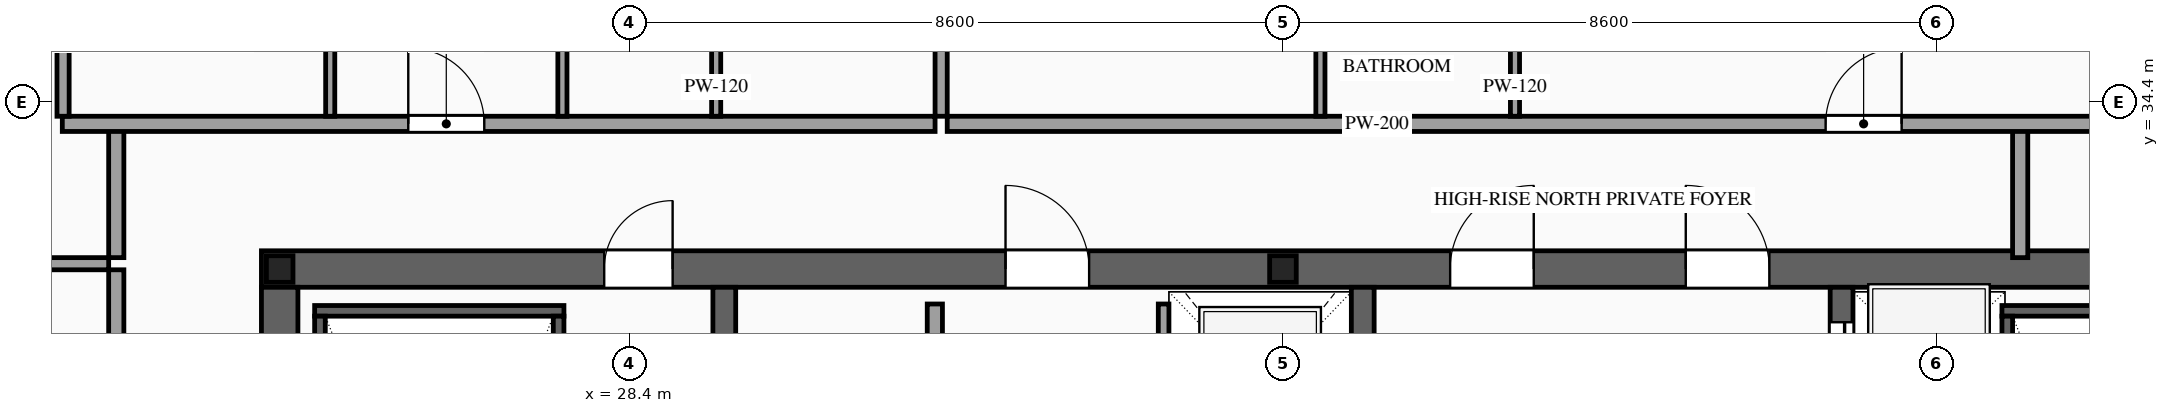
"""IFC4 building model, lengths in metres.
Left out: names, types, materials, properties, quantities, classifications, styles, units other than length and angle.
Written with IfcOpenShell. Run it as: python <this file> out.ifc"""

import sys

from ifc_helpers import new_model, si_unit, direction, frame, frame_2d, origin, origin_2d, place, context, subcontext, project, spatial, rectangle, i_section, extrude, source, transform, mapped, element, fill, save


model = new_model("IFC4")
c1 = context("Model", 3, precision=1e-05, world=origin(), true_north=direction((0.0, 1.0)))
c2 = subcontext(c1, "Body", "Model", "MODEL_VIEW")
j1 = project(units=[si_unit("LENGTHUNIT", "METRE"), si_unit("PLANEANGLEUNIT", "RADIAN")], contexts=[c1])
p1 = place(None, origin())
s1 = spatial("IfcSite", under=j1, at=p1, CompositionType="ELEMENT")
p2 = place(p1, origin())
s2 = spatial("IfcBuilding", under=s1, at=p2, CompositionType="ELEMENT")
p3 = place(p2, frame((0.0, 0.0, 347.2)))
s3 = spatial("IfcBuildingStorey", under=s2, at=p3, CompositionType="ELEMENT", Elevation=347.2)
p4 = place(p3, frame((23.56, 32.2, 0.0), z_axis=(0.0, 0.0, 1.0), x_axis=(1.0, 0.0, 0.0)))
e1 = element("IfcWall", 1, at=p4, inside=s3, PredefinedType="SHEAR", context=c2, shape_type="SweptSolid", body=[
    extrude(rectangle(XDim=26.88, YDim=0.48, at=frame_2d((13.44, 0.0))), origin(), (0.0, 0.0, 1.0), 4.0),
])
p5 = place(p4, frame((4.51, 0.0, 0.0)))
e2 = element("IfcOpeningElement", 2, at=p5, cuts=e1, PredefinedType="OPENING", context=c2, shape_type="SweptSolid", body=[
    extrude(rectangle(XDim=0.9, YDim=2.15, at=frame_2d((0.45, 1.075))), frame((0.0, 0.255, 0.0), z_axis=(0.0, -1.0, 0.0), x_axis=(1.0, 0.0, 0.0)), (0.0, 0.0, 1.0), 0.51),
])
p6 = place(p4, frame((9.79, 0.0, 0.0)))
e3 = element("IfcOpeningElement", 3, at=p6, cuts=e1, PredefinedType="OPENING", context=c2, shape_type="SweptSolid", body=[
    extrude(rectangle(XDim=1.1, YDim=2.2, at=frame_2d((0.55, 1.1))), frame((0.0, 0.255, 0.0), z_axis=(0.0, -1.0, 0.0), x_axis=(1.0, 0.0, 0.0)), (0.0, 0.0, 1.0), 0.51),
])
p7 = place(p4, frame((15.64, 0.0, 0.0)))
e4 = element("IfcOpeningElement", 4, at=p7, cuts=e1, PredefinedType="OPENING", context=c2, shape_type="SweptSolid", body=[
    extrude(rectangle(XDim=1.1, YDim=2.2, at=frame_2d((0.55, 1.1))), frame((0.0, 0.255, 0.0), z_axis=(0.0, -1.0, 0.0), x_axis=(1.0, 0.0, 0.0)), (0.0, 0.0, 1.0), 0.51),
])
p8 = place(p4, frame((18.74, 0.0, 0.0)))
e5 = element("IfcOpeningElement", 5, at=p8, cuts=e1, PredefinedType="OPENING", context=c2, shape_type="SweptSolid", body=[
    extrude(rectangle(XDim=1.1, YDim=2.2, at=frame_2d((0.55, 1.1))), frame((0.0, 0.255, 0.0), z_axis=(0.0, -1.0, 0.0), x_axis=(1.0, 0.0, 0.0)), (0.0, 0.0, 1.0), 0.51),
])
m1 = source(origin(), c2, "Body", "SweptSolid", [
    extrude(rectangle(XDim=12.32, YDim=0.48, at=frame_2d((6.16, 0.0))), origin(), (0.0, 0.0, 1.0), 4.0),
])
p9 = place(p3, frame((23.8, 19.64, 0.0), z_axis=(0.0, 0.0, 1.0), x_axis=(0.0, 1.0, 0.0)))
e6 = element("IfcWall", 6, at=p9, inside=s3, PredefinedType="SHEAR", context=c2, shape_type="MappedRepresentation", body=[
    mapped(m1, transform((0.0, 0.0, 0.0), scale=1.0)),
])
m2 = source(origin(), c2, "Body", "SweptSolid", [
    extrude(rectangle(XDim=12.32, YDim=0.3, at=frame_2d((6.16, 0.0))), origin(), (0.0, 0.0, 1.0), 4.0),
])
for number, where, z_axis, x_axis in (
    (7, (29.65, 19.64, 0.0), (0.0, 0.0, 1.0), (0.0, 1.0, 0.0)),
    (8, (38.05, 19.64, 0.0), (0.0, 0.0, 1.0), (0.0, 1.0, 0.0)),
):
    element("IfcWall", number, at=place(p3, frame(where, z_axis=z_axis, x_axis=x_axis)), inside=s3, PredefinedType="SOLIDWALL", context=c2, shape_type="MappedRepresentation", body=[
        mapped(m2, transform((0.0, 0.0, 0.0), scale=1.0)),
    ])
p10 = place(p3, frame((44.35, 19.64, 0.0), z_axis=(0.0, 0.0, 1.0), x_axis=(0.0, 1.0, 0.0)))
e9 = element("IfcWall", 9, at=p10, inside=s3, PredefinedType="SOLIDWALL", context=c2, shape_type="SweptSolid", body=[
    extrude(rectangle(XDim=12.32, YDim=0.3, at=frame_2d((6.16, 0.0))), origin(), (0.0, 0.0, 1.0), 4.0),
])
p11 = place(p10, frame((6.56, 0.0, 0.0)))
e10 = element("IfcOpeningElement", 10, at=p11, cuts=e9, PredefinedType="OPENING", context=c2, shape_type="SweptSolid", body=[
    extrude(rectangle(XDim=1.1, YDim=2.2, at=frame_2d((0.55, 1.1))), frame((0.0, 0.165, 0.0), z_axis=(0.0, -1.0, 0.0), x_axis=(1.0, 0.0, 0.0)), (0.0, 0.0, 1.0), 0.33),
])
p12 = place(p10, frame((8.66, 0.0, 0.0)))
e11 = element("IfcOpeningElement", 11, at=p12, cuts=e9, PredefinedType="OPENING", context=c2, shape_type="SweptSolid", body=[
    extrude(rectangle(XDim=1.1, YDim=2.2, at=frame_2d((0.55, 1.1))), frame((0.0, 0.165, 0.0), z_axis=(0.0, -1.0, 0.0), x_axis=(1.0, 0.0, 0.0)), (0.0, 0.0, 1.0), 0.33),
])
p13 = place(p10, frame((10.76, 0.0, 0.0)))
e12 = element("IfcOpeningElement", 12, at=p13, cuts=e9, PredefinedType="OPENING", context=c2, shape_type="SweptSolid", body=[
    extrude(rectangle(XDim=1.1, YDim=2.2, at=frame_2d((0.55, 1.1))), frame((0.0, 0.165, 0.0), z_axis=(0.0, -1.0, 0.0), x_axis=(1.0, 0.0, 0.0)), (0.0, 0.0, 1.0), 0.33),
])
m3 = source(origin(), c2, "Body", "SweptSolid", [
    extrude(i_section(OverallWidth=0.35, OverallDepth=0.35, WebThickness=0.012, FlangeThickness=0.019, at=origin_2d()), origin(), (0.0, 0.0, 1.0), 4.0),
])
for number, where, z_axis, x_axis in (
    (13, (23.8, 32.2, 0.0), (0.0, 0.0, 1.0), (1.0, 0.0, 0.0)),
    (14, (37.0, 32.2, 0.0), (0.0, 0.0, 1.0), (1.0, 0.0, 0.0)),
):
    element("IfcColumn", number, at=place(p3, frame(where, z_axis=z_axis, x_axis=x_axis)), inside=s3, PredefinedType="COLUMN", context=c2, shape_type="MappedRepresentation", body=[
        mapped(m3, transform((0.0, 0.0, 0.0), scale=1.0)),
    ])
p14 = place(p3, frame((35.43, 29.4, 0.0), z_axis=(0.0, 0.0, 1.0), x_axis=(0.0, 1.0, 0.0)))
e15 = element("IfcWall", 15, at=p14, inside=s3, PredefinedType="SOLIDWALL", context=c2, shape_type="SweptSolid", body=[
    extrude(rectangle(XDim=2.34, YDim=0.14, at=frame_2d((1.17, 0.0))), origin(), (0.0, 0.0, 1.0), 3.7),
])
p15 = place(p14, frame((0.62, 0.0, 0.0)))
e16 = element("IfcOpeningElement", 16, at=p15, cuts=e15, PredefinedType="OPENING", context=c2, shape_type="SweptSolid", body=[
    extrude(rectangle(XDim=1.1, YDim=2.2, at=frame_2d((0.55, 1.1))), frame((0.0, 0.085, 0.0), z_axis=(0.0, -1.0, 0.0), x_axis=(1.0, 0.0, 0.0)), (0.0, 0.0, 1.0), 0.17),
])
m4 = source(origin(), c2, "Body", "SweptSolid", [
    extrude(rectangle(XDim=3.28, YDim=0.14, at=frame_2d((1.64, 0.0))), origin(), (0.0, 0.0, 1.0), 3.7),
])
p16 = place(p3, frame((24.26, 31.65, 0.0), z_axis=(0.0, 0.0, 1.0), x_axis=(1.0, 0.0, 0.0)))
e17 = element("IfcWall", 17, at=p16, inside=s3, PredefinedType="SOLIDWALL", context=c2, shape_type="MappedRepresentation", body=[
    mapped(m4, transform((0.0, 0.0, 0.0), scale=1.0)),
])
m5 = source(origin(), c2, "Body", "SweptSolid", [
    extrude(rectangle(XDim=8.94, YDim=0.14, at=frame_2d((4.47, 0.0))), origin(), (0.0, 0.0, 1.0), 3.7),
])
for number, where, z_axis, x_axis in (
    (18, (24.33, 22.64, 0.0), (0.0, 0.0, 1.0), (0.0, 1.0, 0.0)),
    (19, (27.47, 22.64, 0.0), (0.0, 0.0, 1.0), (0.0, 1.0, 0.0)),
):
    element("IfcWall", number, at=place(p3, frame(where, z_axis=z_axis, x_axis=x_axis)), inside=s3, PredefinedType="SOLIDWALL", context=c2, shape_type="MappedRepresentation", body=[
        mapped(m5, transform((0.0, 0.0, 0.0), scale=1.0)),
    ])
p17 = place(p3, frame((46.46, 31.65, 0.0), z_axis=(0.0, 0.0, 1.0), x_axis=(1.0, 0.0, 0.0)))
e20 = element("IfcWall", 20, at=p17, inside=s3, PredefinedType="SOLIDWALL", context=c2, shape_type="MappedRepresentation", body=[
    mapped(m4, transform((0.0, 0.0, 0.0), scale=1.0)),
])
p18 = place(p3, frame((46.53, 22.64, 0.0), z_axis=(0.0, 0.0, 1.0), x_axis=(0.0, 1.0, 0.0)))
e21 = element("IfcWall", 21, at=p18, inside=s3, PredefinedType="SOLIDWALL", context=c2, shape_type="MappedRepresentation", body=[
    mapped(m5, transform((0.0, 0.0, 0.0), scale=1.0)),
])
p19 = place(p3, frame((32.42, 28.05, 0.0), z_axis=(0.0, 0.0, 1.0), x_axis=(0.0, 1.0, 0.0)))
e22 = element("IfcWall", 22, at=p19, inside=s3, PredefinedType="PARTITIONING", context=c2, shape_type="SweptSolid", body=[
    extrude(rectangle(XDim=3.69, YDim=0.2, at=frame_2d((1.845, 0.0))), origin(), (0.0, 0.0, 1.0), 3.7),
])
p20 = place(p19, frame((1.395, 0.0, 0.0)))
e23 = element("IfcOpeningElement", 23, at=p20, cuts=e22, PredefinedType="OPENING", context=c2, shape_type="SweptSolid", body=[
    extrude(rectangle(XDim=0.9, YDim=2.15, at=frame_2d((0.45, 1.075))), frame((0.0, 0.115, 0.0), z_axis=(0.0, -1.0, 0.0), x_axis=(1.0, 0.0, 0.0)), (0.0, 0.0, 1.0), 0.23),
])
m6 = source(origin(), c2, "Body", "SweptSolid", [
    extrude(rectangle(XDim=1.7, YDim=0.2, at=frame_2d((0.85, 0.0))), origin(), (0.0, 0.0, 1.0), 3.7),
])
for number, where, z_axis, x_axis in (
    (24, (21.65, 32.35, 0.0), (0.0, 0.0, 1.0), (0.0, 1.0, 0.0)),
    (25, (46.7, 32.35, 0.0), (0.0, 0.0, 1.0), (0.0, 1.0, 0.0)),
):
    element("IfcWall", number, at=place(p3, frame(where, z_axis=z_axis, x_axis=x_axis)), inside=s3, PredefinedType="PARTITIONING", context=c2, shape_type="MappedRepresentation", body=[
        mapped(m6, transform((0.0, 0.0, 0.0), scale=1.0)),
    ])
p21 = place(p3, frame((20.94, 34.11, 0.0), z_axis=(0.0, 0.0, 1.0), x_axis=(1.0, 0.0, 0.0)))
e26 = element("IfcWall", 26, at=p21, inside=s3, PredefinedType="PARTITIONING", context=c2, shape_type="SweptSolid", body=[
    extrude(rectangle(XDim=11.483, YDim=0.2, at=frame_2d((5.742, 0.0))), origin(), (0.0, 0.0, 1.0), 3.7),
])
p22 = place(p21, frame((4.552, 0.0, 0.0)))
e27 = element("IfcOpeningElement", 27, at=p22, cuts=e26, PredefinedType="OPENING", context=c2, shape_type="SweptSolid", body=[
    extrude(rectangle(XDim=1.0, YDim=2.2, at=frame_2d((0.5, 1.1))), frame((0.0, 0.115, 0.0), z_axis=(0.0, -1.0, 0.0), x_axis=(1.0, 0.0, 0.0)), (0.0, 0.0, 1.0), 0.23),
])
m7 = source(origin(), c2, "Body", "SweptSolid", [
    extrude(rectangle(XDim=10.54, YDim=0.16, at=frame_2d((5.27, 0.0))), origin(), (0.0, 0.0, 1.0), 3.7),
])
p23 = place(p3, frame((32.503, 34.21, 0.0), z_axis=(0.0, 0.0, 1.0), x_axis=(0.0, 1.0, 0.0)))
e28 = element("IfcWall", 28, at=p23, inside=s3, PredefinedType="PARTITIONING", context=c2, shape_type="MappedRepresentation", body=[
    mapped(m7, transform((0.0, 0.0, 0.0), scale=1.0)),
])
m8 = source(origin(), c2, "Body", "SweptSolid", [
    extrude(rectangle(XDim=2.9, YDim=0.12, at=frame_2d((1.45, 0.0))), origin(), (0.0, 0.0, 1.0), 3.7),
])
p24 = place(p3, frame((24.465, 34.21, 0.0), z_axis=(0.0, 0.0, 1.0), x_axis=(0.0, 1.0, 0.0)))
e29 = element("IfcWall", 29, at=p24, inside=s3, PredefinedType="PARTITIONING", context=c2, shape_type="MappedRepresentation", body=[
    mapped(m8, transform((0.0, 0.0, 0.0), scale=1.0)),
])
p25 = place(p3, frame((29.543, 34.21, 0.0), z_axis=(0.0, 0.0, 1.0), x_axis=(0.0, 1.0, 0.0)))
e30 = element("IfcWall", 30, at=p25, inside=s3, PredefinedType="PARTITIONING", context=c2, shape_type="SweptSolid", body=[
    extrude(rectangle(XDim=2.9, YDim=0.12, at=frame_2d((1.45, 0.0))), origin(), (0.0, 0.0, 1.0), 3.7),
])
p26 = place(p25, frame((1.025, 0.0, 0.0)))
e31 = element("IfcOpeningElement", 31, at=p26, cuts=e30, PredefinedType="OPENING", context=c2, shape_type="SweptSolid", body=[
    extrude(rectangle(XDim=0.85, YDim=2.1, at=frame_2d((0.425, 1.05))), frame((0.0, 0.075, 0.0), z_axis=(0.0, -1.0, 0.0), x_axis=(1.0, 0.0, 0.0)), (0.0, 0.0, 1.0), 0.15),
])
p27 = place(p3, frame((27.52, 34.21, 0.0), z_axis=(0.0, 0.0, 1.0), x_axis=(0.0, 1.0, 0.0)))
e32 = element("IfcWall", 32, at=p27, inside=s3, PredefinedType="PARTITIONING", context=c2, shape_type="SweptSolid", body=[
    extrude(rectangle(XDim=2.9, YDim=0.12, at=frame_2d((1.45, 0.0))), origin(), (0.0, 0.0, 1.0), 3.7),
])
p28 = place(p27, frame((1.025, 0.0, 0.0)))
e33 = element("IfcOpeningElement", 33, at=p28, cuts=e32, PredefinedType="OPENING", context=c2, shape_type="SweptSolid", body=[
    extrude(rectangle(XDim=0.85, YDim=2.1, at=frame_2d((0.425, 1.05))), frame((0.0, 0.075, 0.0), z_axis=(0.0, -1.0, 0.0), x_axis=(1.0, 0.0, 0.0)), (0.0, 0.0, 1.0), 0.15),
])
p29 = place(p3, frame((32.583, 34.11, 0.0), z_axis=(0.0, 0.0, 1.0), x_axis=(1.0, 0.0, 0.0)))
e34 = element("IfcWall", 34, at=p29, inside=s3, PredefinedType="PARTITIONING", context=c2, shape_type="SweptSolid", body=[
    extrude(rectangle(XDim=20.477, YDim=0.2, at=frame_2d((10.239, 0.0))), origin(), (0.0, 0.0, 1.0), 3.7),
])
p30 = place(p29, frame((11.557, 0.0, 0.0)))
e35 = element("IfcOpeningElement", 35, at=p30, cuts=e34, PredefinedType="OPENING", context=c2, shape_type="SweptSolid", body=[
    extrude(rectangle(XDim=1.0, YDim=2.2, at=frame_2d((0.5, 1.1))), frame((0.0, 0.115, 0.0), z_axis=(0.0, -1.0, 0.0), x_axis=(1.0, 0.0, 0.0)), (0.0, 0.0, 1.0), 0.23),
])
m9 = source(origin(), c2, "Body", "SweptSolid", [
    extrude(rectangle(XDim=10.39, YDim=0.16, at=frame_2d((5.195, 0.0))), origin(), (0.0, 0.0, 1.0), 3.7),
])
p31 = place(p3, frame((20.95, 34.21, 0.0), z_axis=(0.0, 0.0, 1.0), x_axis=(0.0, 1.0, 0.0)))
e36 = element("IfcWall", 36, at=p31, inside=s3, PredefinedType="PARTITIONING", context=c2, shape_type="MappedRepresentation", body=[
    mapped(m9, transform((0.0, 0.0, 0.0), scale=1.0)),
])
p32 = place(p3, frame((37.493, 34.21, 0.0), z_axis=(0.0, 0.0, 1.0), x_axis=(0.0, 1.0, 0.0)))
e37 = element("IfcWall", 37, at=p32, inside=s3, PredefinedType="PARTITIONING", context=c2, shape_type="MappedRepresentation", body=[
    mapped(m8, transform((0.0, 0.0, 0.0), scale=1.0)),
])
p33 = place(p3, frame((40.053, 34.21, 0.0), z_axis=(0.0, 0.0, 1.0), x_axis=(0.0, 1.0, 0.0)))
e38 = element("IfcWall", 38, at=p33, inside=s3, PredefinedType="PARTITIONING", context=c2, shape_type="SweptSolid", body=[
    extrude(rectangle(XDim=2.9, YDim=0.12, at=frame_2d((1.45, 0.0))), origin(), (0.0, 0.0, 1.0), 3.7),
])
p34 = place(p33, frame((1.025, 0.0, 0.0)))
e39 = element("IfcOpeningElement", 39, at=p34, cuts=e38, PredefinedType="OPENING", context=c2, shape_type="SweptSolid", body=[
    extrude(rectangle(XDim=0.85, YDim=2.1, at=frame_2d((0.425, 1.05))), frame((0.0, 0.075, 0.0), z_axis=(0.0, -1.0, 0.0), x_axis=(1.0, 0.0, 0.0)), (0.0, 0.0, 1.0), 0.15),
])
p35 = place(p3, frame((21.65, 19.41, 0.0), z_axis=(0.0, 0.0, 1.0), x_axis=(0.0, 1.0, 0.0)))
e40 = element("IfcWall", 40, at=p35, inside=s3, PredefinedType="PARTITIONING", context=c2, shape_type="SweptSolid", body=[
    extrude(rectangle(XDim=12.78, YDim=0.2, at=frame_2d((6.39, 0.0))), origin(), (0.0, 0.0, 1.0), 3.7),
])
p36 = place(p35, frame((5.89, 0.0, 0.0)))
e41 = element("IfcOpeningElement", 41, at=p36, cuts=e40, PredefinedType="OPENING", context=c2, shape_type="SweptSolid", body=[
    extrude(rectangle(XDim=1.0, YDim=2.2, at=frame_2d((0.5, 1.1))), frame((0.0, 0.115, 0.0), z_axis=(0.0, -1.0, 0.0), x_axis=(1.0, 0.0, 0.0)), (0.0, 0.0, 1.0), 0.23),
])
m10 = source(origin(), c2, "Body", "SweptSolid", [
    extrude(rectangle(XDim=3.5, YDim=0.16, at=frame_2d((1.75, 0.0))), origin(), (0.0, 0.0, 1.0), 3.245),
])
p37 = place(p3, frame((18.05, 32.27, 0.0), z_axis=(0.0, 0.0, 1.0), x_axis=(1.0, 0.0, 0.0)))
e42 = element("IfcWall", 42, at=p37, inside=s3, PredefinedType="PARTITIONING", context=c2, shape_type="MappedRepresentation", body=[
    mapped(m10, transform((0.0, 0.0, 0.0), scale=1.0)),
])
m11 = source(origin(), c2, "Body", "SweptSolid", [
    extrude(rectangle(XDim=1.1, YDim=2.2, at=frame_2d((0.55, 1.1))), frame((0.0, 0.025, 0.0), z_axis=(0.0, -1.0, 0.0), x_axis=(1.0, 0.0, 0.0)), (0.0, 0.0, 1.0), 0.05),
])
p38 = place(p13, origin())
e43 = element("IfcDoor", 43, at=p38, inside=s3, OperationType="SLIDING_TO_LEFT", PredefinedType="DOOR", context=c2, shape_type="MappedRepresentation", body=[
    mapped(m11, transform((0.0, 0.0, 0.0), scale=1.0)),
])
fill(e12, e43)
m12 = source(origin(), c2, "Body", "SweptSolid", [
    extrude(rectangle(XDim=0.9, YDim=2.15, at=frame_2d((0.45, 1.075))), frame((0.0, 0.025, 0.0), z_axis=(0.0, -1.0, 0.0), x_axis=(1.0, 0.0, 0.0)), (0.0, 0.0, 1.0), 0.05),
])
p39 = place(p5, origin())
e44 = element("IfcDoor", 44, at=p39, inside=s3, OperationType="SINGLE_SWING_RIGHT", PredefinedType="DOOR", context=c2, shape_type="MappedRepresentation", body=[
    mapped(m12, transform((0.0, 0.0, 0.0), scale=1.0)),
])
fill(e2, e44)
m13 = source(origin(), c2, "Body", "SweptSolid", [
    extrude(rectangle(XDim=1.1, YDim=2.2, at=frame_2d((0.55, 1.1))), frame((0.0, 0.025, 0.0), z_axis=(0.0, -1.0, 0.0), x_axis=(1.0, 0.0, 0.0)), (0.0, 0.0, 1.0), 0.05),
])
p40 = place(p6, origin())
e45 = element("IfcDoor", 45, at=p40, inside=s3, OperationType="SINGLE_SWING_LEFT", PredefinedType="DOOR", context=c2, shape_type="MappedRepresentation", body=[
    mapped(m13, transform((0.0, 0.0, 0.0), scale=1.0)),
])
fill(e3, e45)
p41 = place(p7, origin())
e46 = element("IfcDoor", 46, at=p41, inside=s3, OperationType="SINGLE_SWING_RIGHT", PredefinedType="DOOR", context=c2, shape_type="MappedRepresentation", body=[
    mapped(m13, transform((0.0, 0.0, 0.0), scale=1.0)),
])
fill(e4, e46)
p42 = place(p8, origin())
e47 = element("IfcDoor", 47, at=p42, inside=s3, OperationType="SINGLE_SWING_LEFT", PredefinedType="DOOR", context=c2, shape_type="MappedRepresentation", body=[
    mapped(m13, transform((0.0, 0.0, 0.0), scale=1.0)),
])
fill(e5, e47)
m14 = source(origin(), c2, "Body", "SweptSolid", [
    extrude(rectangle(XDim=1.0, YDim=2.2, at=frame_2d((0.5, 1.1))), frame((0.0, 0.025, 0.0), z_axis=(0.0, -1.0, 0.0), x_axis=(1.0, 0.0, 0.0)), (0.0, 0.0, 1.0), 0.05),
])
p43 = place(p22, origin())
e48 = element("IfcDoor", 48, at=p43, inside=s3, OperationType="SINGLE_SWING_LEFT", PredefinedType="DOOR", context=c2, shape_type="MappedRepresentation", body=[
    mapped(m14, transform((0.0, 0.0, 0.0), scale=1.0)),
])
fill(e27, e48)
p44 = place(p30, origin())
e49 = element("IfcDoor", 49, at=p44, inside=s3, OperationType="SINGLE_SWING_RIGHT", PredefinedType="DOOR", context=c2, shape_type="MappedRepresentation", body=[
    mapped(m14, transform((0.0, 0.0, 0.0), scale=1.0)),
])
fill(e35, e49)
save(model, sys.argv[1])
